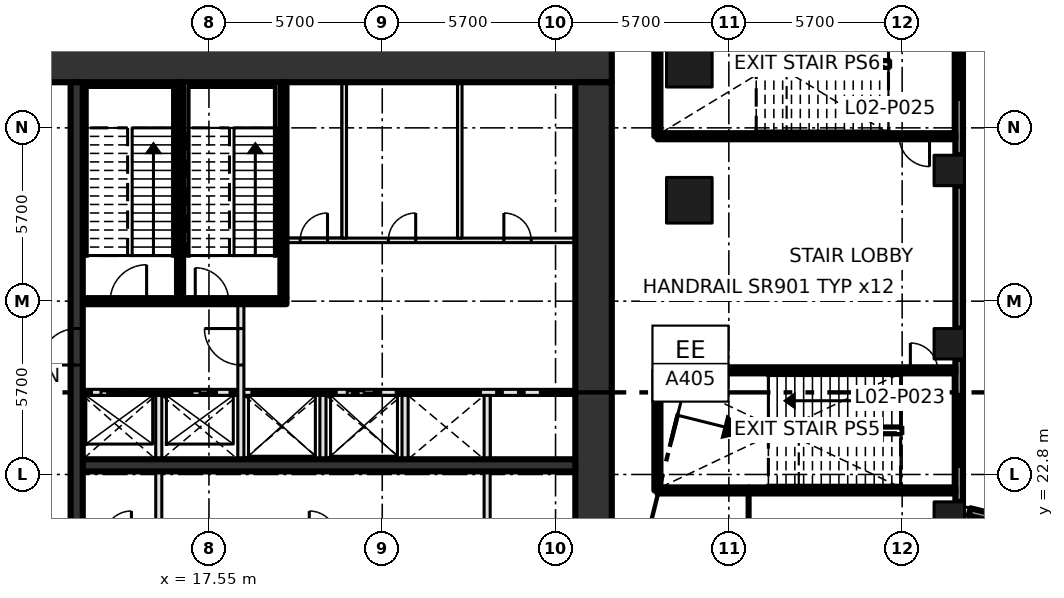
"""IFC4 building model, lengths in metres.
Left out: names, types, materials, properties, quantities, classifications, styles, units other than length and angle.
Written with IfcOpenShell. Run it as: python <this file> out.ifc"""

import sys

from ifc_helpers import new_model, si_unit, direction, frame, frame_2d, origin, origin_2d, place, context, subcontext, project, spatial, rectangle, extrude, element, fill, save


model = new_model("IFC4")
c1 = context("Model", 3, precision=1e-05, world=origin(), true_north=direction((0.0, 1.0)))
c2 = subcontext(c1, "Body", "Model", "MODEL_VIEW")
j1 = project(units=[si_unit("LENGTHUNIT", "METRE"), si_unit("PLANEANGLEUNIT", "RADIAN")], contexts=[c1])
p1 = place(None, origin())
s1 = spatial("IfcSite", under=j1, at=p1, CompositionType="ELEMENT")
p2 = place(p1, origin())
s2 = spatial("IfcBuilding", under=s1, at=p2, CompositionType="ELEMENT")
p3 = place(p2, frame((0.0, 0.0, 12.6)))
s3 = spatial("IfcBuildingStorey", under=s2, at=p3, CompositionType="ELEMENT", Elevation=12.6)
for number, where, z_axis, x_axis in (
    (1, (33.35, 26.119, 0.0), (0.0, 0.0, 1.0), (1.0, 0.0, 0.0)),
    (2, (33.35, 31.819, 0.0), (0.0, 0.0, 1.0), (1.0, 0.0, 0.0)),
    (3, (33.35, 36.294, 0.0), (0.0, 0.0, 1.0), (1.0, 0.0, 0.0)),
):
    element("IfcColumn", number, at=place(p3, frame(where, z_axis=z_axis, x_axis=x_axis)), inside=s3, PredefinedType="COLUMN", context=c2, shape_type="SweptSolid", body=[
        extrude(rectangle(XDim=1.5, YDim=1.5, at=origin_2d()), origin(), (0.0, 0.0, 1.0), 6.0),
    ])
for number, where, z_axis, x_axis in (
    (4, (41.9, 21.399, 0.0), (0.0, 0.0, 1.0), (1.0, 0.0, 0.0)),
    (5, (41.9, 27.099, 0.0), (0.0, 0.0, 1.0), (1.0, 0.0, 0.0)),
    (6, (41.9, 32.799, 0.0), (0.0, 0.0, 1.0), (1.0, 0.0, 0.0)),
):
    element("IfcColumn", number, at=place(p3, frame(where, z_axis=z_axis, x_axis=x_axis)), inside=s3, PredefinedType="COLUMN", context=c2, shape_type="SweptSolid", body=[
        extrude(rectangle(XDim=1.0, YDim=1.0, at=origin_2d()), origin(), (0.0, 0.0, 1.0), 6.0),
    ])
p4 = place(p3, frame((8.0, 36.3, -0.45), z_axis=(0.0, 0.0, 1.0), x_axis=(1.0, 0.0, 0.0)))
e7 = element("IfcWall", 7, at=p4, inside=s3, PredefinedType="SHEAR", context=c2, shape_type="SweptSolid", body=[
    extrude(rectangle(XDim=22.8, YDim=1.2, at=frame_2d((11.4, 0.0))), origin(), (0.0, 0.0, 1.0), 6.0),
])
p5 = place(p4, frame((2.3, 0.0, 0.45)))
e8 = element("IfcOpeningElement", 8, at=p5, cuts=e7, PredefinedType="OPENING", context=c2, shape_type="SweptSolid", body=[
    extrude(rectangle(XDim=1.8, YDim=2.1, at=frame_2d((0.9, 1.05))), frame((0.0, 0.61, 0.0), z_axis=(0.0, -1.0, 0.0), x_axis=(1.0, 0.0, 0.0)), (0.0, 0.0, 1.0), 1.22),
])
p6 = place(p3, frame((30.2, 15.3, -0.45), z_axis=(0.0, 0.0, 1.0), x_axis=(0.0, 1.0, 0.0)))
e9 = element("IfcWall", 9, at=p6, inside=s3, PredefinedType="SHEAR", context=c2, shape_type="SweptSolid", body=[
    extrude(rectangle(XDim=20.4, YDim=1.2, at=frame_2d((10.2, 0.0))), origin(), (0.0, 0.0, 1.0), 6.0),
])
p7 = place(p3, frame((13.4, 23.1, 0.0), z_axis=(0.0, 0.0, 1.0), x_axis=(1.0, 0.0, 0.0)))
e10 = element("IfcWall", 10, at=p7, inside=s3, PredefinedType="SHEAR", context=c2, shape_type="SweptSolid", body=[
    extrude(rectangle(XDim=16.2, YDim=0.4, at=frame_2d((8.1, 0.0))), origin(), (0.0, 0.0, 1.0), 5.55),
])
p8 = place(p3, frame((13.4, 25.5, 0.0), z_axis=(0.0, 0.0, 1.0), x_axis=(1.0, 0.0, 0.0)))
e11 = element("IfcWall", 11, at=p8, inside=s3, PredefinedType="SOLIDWALL", context=c2, shape_type="SweptSolid", body=[
    extrude(rectangle(XDim=16.2, YDim=0.2, at=frame_2d((8.1, 0.0))), origin(), (0.0, 0.0, 1.0), 5.55),
])
p9 = place(p8, frame((0.6, 0.0, 0.0)))
e12 = element("IfcOpeningElement", 12, at=p9, cuts=e11, PredefinedType="OPENING", context=c2, shape_type="SweptSolid", body=[
    extrude(rectangle(XDim=1.1, YDim=2.1, at=frame_2d((0.55, 1.05))), frame((0.0, 0.11, 0.0), z_axis=(0.0, -1.0, 0.0), x_axis=(1.0, 0.0, 0.0)), (0.0, 0.0, 1.0), 0.22),
])
p10 = place(p8, frame((3.3, 0.0, 0.0)))
e13 = element("IfcOpeningElement", 13, at=p10, cuts=e11, PredefinedType="OPENING", context=c2, shape_type="SweptSolid", body=[
    extrude(rectangle(XDim=1.1, YDim=2.1, at=frame_2d((0.55, 1.05))), frame((0.0, 0.11, 0.0), z_axis=(0.0, -1.0, 0.0), x_axis=(1.0, 0.0, 0.0)), (0.0, 0.0, 1.0), 0.22),
])
p11 = place(p8, frame((6.0, 0.0, 0.0)))
e14 = element("IfcOpeningElement", 14, at=p11, cuts=e11, PredefinedType="OPENING", context=c2, shape_type="SweptSolid", body=[
    extrude(rectangle(XDim=1.1, YDim=2.1, at=frame_2d((0.55, 1.05))), frame((0.0, 0.11, 0.0), z_axis=(0.0, -1.0, 0.0), x_axis=(1.0, 0.0, 0.0)), (0.0, 0.0, 1.0), 0.22),
])
p12 = place(p8, frame((8.7, 0.0, 0.0)))
e15 = element("IfcOpeningElement", 15, at=p12, cuts=e11, PredefinedType="OPENING", context=c2, shape_type="SweptSolid", body=[
    extrude(rectangle(XDim=1.1, YDim=2.1, at=frame_2d((0.55, 1.05))), frame((0.0, 0.11, 0.0), z_axis=(0.0, -1.0, 0.0), x_axis=(1.0, 0.0, 0.0)), (0.0, 0.0, 1.0), 0.22),
])
p13 = place(p3, frame((13.4, 28.5, 0.0), z_axis=(0.0, 0.0, 1.0), x_axis=(1.0, 0.0, 0.0)))
e16 = element("IfcWall", 16, at=p13, inside=s3, PredefinedType="SOLIDWALL", context=c2, shape_type="SweptSolid", body=[
    extrude(rectangle(XDim=6.7, YDim=0.2, at=frame_2d((3.35, 0.0))), origin(), (0.0, 0.0, 1.0), 5.55),
])
p14 = place(p13, frame((0.9, 0.0, 0.0)))
e17 = element("IfcOpeningElement", 17, at=p14, cuts=e16, PredefinedType="OPENING", context=c2, shape_type="SweptSolid", body=[
    extrude(rectangle(XDim=1.2, YDim=2.1, at=frame_2d((0.6, 1.05))), frame((0.0, 0.11, 0.0), z_axis=(0.0, -1.0, 0.0), x_axis=(1.0, 0.0, 0.0)), (0.0, 0.0, 1.0), 0.22),
])
p15 = place(p13, frame((3.7, 0.0, 0.0)))
e18 = element("IfcOpeningElement", 18, at=p15, cuts=e16, PredefinedType="OPENING", context=c2, shape_type="SweptSolid", body=[
    extrude(rectangle(XDim=1.1, YDim=2.1, at=frame_2d((0.55, 1.05))), frame((0.0, 0.11, 0.0), z_axis=(0.0, -1.0, 0.0), x_axis=(1.0, 0.0, 0.0)), (0.0, 0.0, 1.0), 0.22),
])
p16 = place(p3, frame((20.1, 30.5, 0.0), z_axis=(0.0, 0.0, 1.0), x_axis=(1.0, 0.0, 0.0)))
e19 = element("IfcWall", 19, at=p16, inside=s3, PredefinedType="PARTITIONING", context=c2, shape_type="SweptSolid", body=[
    extrude(rectangle(XDim=9.5, YDim=0.15, at=frame_2d((4.75, 0.0))), origin(), (0.0, 0.0, 1.0), 5.55),
])
p17 = place(p16, frame((0.45, 0.0, 0.0)))
e20 = element("IfcOpeningElement", 20, at=p17, cuts=e19, PredefinedType="OPENING", context=c2, shape_type="SweptSolid", body=[
    extrude(rectangle(XDim=0.9, YDim=2.1, at=frame_2d((0.45, 1.05))), frame((0.0, 0.085, 0.0), z_axis=(0.0, -1.0, 0.0), x_axis=(1.0, 0.0, 0.0)), (0.0, 0.0, 1.0), 0.17),
])
p18 = place(p16, frame((3.35, 0.0, 0.0)))
e21 = element("IfcOpeningElement", 21, at=p18, cuts=e19, PredefinedType="OPENING", context=c2, shape_type="SweptSolid", body=[
    extrude(rectangle(XDim=0.9, YDim=2.1, at=frame_2d((0.45, 1.05))), frame((0.0, 0.085, 0.0), z_axis=(0.0, -1.0, 0.0), x_axis=(1.0, 0.0, 0.0)), (0.0, 0.0, 1.0), 0.17),
])
p19 = place(p16, frame((7.15, 0.0, 0.0)))
e22 = element("IfcOpeningElement", 22, at=p19, cuts=e19, PredefinedType="OPENING", context=c2, shape_type="SweptSolid", body=[
    extrude(rectangle(XDim=0.9, YDim=2.1, at=frame_2d((0.45, 1.05))), frame((0.0, 0.085, 0.0), z_axis=(0.0, -1.0, 0.0), x_axis=(1.0, 0.0, 0.0)), (0.0, 0.0, 1.0), 0.17),
])
p20 = place(p3, frame((13.2, 15.3, 0.0), z_axis=(0.0, 0.0, 1.0), x_axis=(0.0, 1.0, 0.0)))
e23 = element("IfcWall", 23, at=p20, inside=s3, PredefinedType="SHEAR", context=c2, shape_type="SweptSolid", body=[
    extrude(rectangle(XDim=20.4, YDim=0.4, at=frame_2d((10.2, 0.0))), origin(), (0.0, 0.0, 1.0), 5.55),
])
p21 = place(p20, frame((3.0, 0.0, 0.0)))
e24 = element("IfcOpeningElement", 24, at=p21, cuts=e23, PredefinedType="OPENING", context=c2, shape_type="SweptSolid", body=[
    extrude(rectangle(XDim=1.8, YDim=2.1, at=frame_2d((0.9, 1.05))), frame((0.0, 0.21, 0.0), z_axis=(0.0, -1.0, 0.0), x_axis=(1.0, 0.0, 0.0)), (0.0, 0.0, 1.0), 0.42),
])
p22 = place(p20, frame((11.1, 0.0, 0.0)))
e25 = element("IfcOpeningElement", 25, at=p22, cuts=e23, PredefinedType="OPENING", context=c2, shape_type="SweptSolid", body=[
    extrude(rectangle(XDim=1.2, YDim=2.1, at=frame_2d((0.6, 1.05))), frame((0.0, 0.21, 0.0), z_axis=(0.0, -1.0, 0.0), x_axis=(1.0, 0.0, 0.0)), (0.0, 0.0, 1.0), 0.42),
])
p23 = place(p3, frame((15.9, 20.775, 0.0), z_axis=(0.0, 0.0, 1.0), x_axis=(0.0, 1.0, 0.0)))
e26 = element("IfcWall", 26, at=p23, inside=s3, PredefinedType="SOLIDWALL", context=c2, shape_type="SweptSolid", body=[
    extrude(rectangle(XDim=4.625, YDim=0.2, at=frame_2d((2.312, 0.0))), origin(), (0.0, 0.0, 1.0), 5.55),
])
p24 = place(p3, frame((16.6, 28.6, 0.0), z_axis=(0.0, 0.0, 1.0), x_axis=(0.0, 1.0, 0.0)))
e27 = element("IfcWall", 27, at=p24, inside=s3, PredefinedType="SOLIDWALL", context=c2, shape_type="SweptSolid", body=[
    extrude(rectangle(XDim=7.1, YDim=0.2, at=frame_2d((3.55, 0.0))), origin(), (0.0, 0.0, 1.0), 5.55),
])
p25 = place(p3, frame((18.6, 23.3, 0.0), z_axis=(0.0, 0.0, 1.0), x_axis=(0.0, 1.0, 0.0)))
e28 = element("IfcWall", 28, at=p25, inside=s3, PredefinedType="SOLIDWALL", context=c2, shape_type="SweptSolid", body=[
    extrude(rectangle(XDim=5.1, YDim=0.2, at=frame_2d((2.55, 0.0))), origin(), (0.0, 0.0, 1.0), 5.55),
])
p26 = place(p25, frame((3.1, 0.0, 0.0)))
e29 = element("IfcOpeningElement", 29, at=p26, cuts=e28, PredefinedType="OPENING", context=c2, shape_type="SweptSolid", body=[
    extrude(rectangle(XDim=1.2, YDim=2.1, at=frame_2d((0.6, 1.05))), frame((0.0, 0.11, 0.0), z_axis=(0.0, -1.0, 0.0), x_axis=(1.0, 0.0, 0.0)), (0.0, 0.0, 1.0), 0.22),
])
p27 = place(p3, frame((20.0, 28.6, 0.0), z_axis=(0.0, 0.0, 1.0), x_axis=(0.0, 1.0, 0.0)))
e30 = element("IfcWall", 30, at=p27, inside=s3, PredefinedType="SOLIDWALL", context=c2, shape_type="SweptSolid", body=[
    extrude(rectangle(XDim=7.1, YDim=0.2, at=frame_2d((3.55, 0.0))), origin(), (0.0, 0.0, 1.0), 5.55),
])
p28 = place(p3, frame((21.3, 23.3, 0.0), z_axis=(0.0, 0.0, 1.0), x_axis=(0.0, 1.0, 0.0)))
e31 = element("IfcWall", 31, at=p28, inside=s3, PredefinedType="SOLIDWALL", context=c2, shape_type="SweptSolid", body=[
    extrude(rectangle(XDim=2.1, YDim=0.2, at=frame_2d((1.05, 0.0))), origin(), (0.0, 0.0, 1.0), 5.55),
])
p29 = place(p3, frame((22.0, 30.575, 0.0), z_axis=(0.0, 0.0, 1.0), x_axis=(0.0, 1.0, 0.0)))
e32 = element("IfcWall", 32, at=p29, inside=s3, PredefinedType="PARTITIONING", context=c2, shape_type="SweptSolid", body=[
    extrude(rectangle(XDim=5.125, YDim=0.15, at=frame_2d((2.562, 0.0))), origin(), (0.0, 0.0, 1.0), 5.55),
])
p30 = place(p3, frame((24.0, 23.3, 0.0), z_axis=(0.0, 0.0, 1.0), x_axis=(0.0, 1.0, 0.0)))
e33 = element("IfcWall", 33, at=p30, inside=s3, PredefinedType="SOLIDWALL", context=c2, shape_type="SweptSolid", body=[
    extrude(rectangle(XDim=2.1, YDim=0.2, at=frame_2d((1.05, 0.0))), origin(), (0.0, 0.0, 1.0), 5.55),
])
p31 = place(p3, frame((25.8, 30.575, 0.0), z_axis=(0.0, 0.0, 1.0), x_axis=(0.0, 1.0, 0.0)))
e34 = element("IfcWall", 34, at=p31, inside=s3, PredefinedType="PARTITIONING", context=c2, shape_type="SweptSolid", body=[
    extrude(rectangle(XDim=5.125, YDim=0.15, at=frame_2d((2.562, 0.0))), origin(), (0.0, 0.0, 1.0), 5.55),
])
p32 = place(p3, frame((26.7, 20.775, 0.0), z_axis=(0.0, 0.0, 1.0), x_axis=(0.0, 1.0, 0.0)))
e35 = element("IfcWall", 35, at=p32, inside=s3, PredefinedType="SOLIDWALL", context=c2, shape_type="SweptSolid", body=[
    extrude(rectangle(XDim=4.625, YDim=0.2, at=frame_2d((2.312, 0.0))), origin(), (0.0, 0.0, 1.0), 5.55),
])
p33 = place(p3, frame((32.3, 22.275, 0.0), z_axis=(0.0, 0.0, 1.0), x_axis=(0.0, 1.0, 0.0)))
e36 = element("IfcWall", 36, at=p33, inside=s3, PredefinedType="SOLIDWALL", context=c2, shape_type="SweptSolid", body=[
    extrude(rectangle(XDim=3.95, YDim=0.2, at=frame_2d((1.975, 0.0))), origin(), (0.0, 0.0, 1.0), 5.55),
])
p34 = place(p3, frame((32.3, 33.925, 0.0), z_axis=(0.0, 0.0, 1.0), x_axis=(0.0, 1.0, 0.0)))
e37 = element("IfcWall", 37, at=p34, inside=s3, PredefinedType="SOLIDWALL", context=c2, shape_type="SweptSolid", body=[
    extrude(rectangle(XDim=4.75, YDim=0.2, at=frame_2d((2.375, 0.0))), origin(), (0.0, 0.0, 1.0), 5.55),
])
p35 = place(p3, frame((34.12, 26.225, 0.0), z_axis=(0.0, 0.0, 1.0), x_axis=(1.0, 0.0, 0.0)))
e38 = element("IfcWall", 38, at=p35, inside=s3, PredefinedType="SOLIDWALL", context=c2, shape_type="SweptSolid", body=[
    extrude(rectangle(XDim=7.98, YDim=0.2, at=frame_2d((3.99, 0.0))), origin(), (0.0, 0.0, 1.0), 5.55),
])
p36 = place(p35, frame((6.5, 0.0, 0.0)))
e39 = element("IfcOpeningElement", 39, at=p36, cuts=e38, PredefinedType="OPENING", context=c2, shape_type="SweptSolid", body=[
    extrude(rectangle(XDim=0.9, YDim=2.1, at=frame_2d((0.45, 1.05))), frame((0.0, 0.11, 0.0), z_axis=(0.0, -1.0, 0.0), x_axis=(1.0, 0.0, 0.0)), (0.0, 0.0, 1.0), 0.22),
])
p37 = place(p3, frame((35.3, 9.6, 0.0), z_axis=(0.0, 0.0, 1.0), x_axis=(0.0, 1.0, 0.0)))
e40 = element("IfcWall", 40, at=p37, inside=s3, PredefinedType="PARTITIONING", context=c2, shape_type="SweptSolid", body=[
    extrude(rectangle(XDim=12.675, YDim=0.1, at=frame_2d((6.337, 0.0))), origin(), (0.0, 0.0, 1.0), 5.55),
])
p38 = place(p37, frame((8.28, 0.0, 0.0)))
e41 = element("IfcOpeningElement", 41, at=p38, cuts=e40, PredefinedType="OPENING", context=c2, shape_type="SweptSolid", body=[
    extrude(rectangle(XDim=1.0, YDim=2.1, at=frame_2d((0.5, 1.05))), frame((0.0, 0.06, 0.0), z_axis=(0.0, -1.0, 0.0), x_axis=(1.0, 0.0, 0.0)), (0.0, 0.0, 1.0), 0.12),
])
p39 = place(p3, frame((35.3, 22.275, 0.0), z_axis=(0.0, 0.0, 1.0), x_axis=(-1.0, 0.0, 0.0)))
e42 = element("IfcWall", 42, at=p39, inside=s3, PredefinedType="SOLIDWALL", context=c2, shape_type="SweptSolid", body=[
    extrude(rectangle(XDim=3.0, YDim=0.2, at=frame_2d((1.5, 0.0))), origin(), (0.0, 0.0, 1.0), 5.55),
])
p40 = place(p3, frame((42.1, 33.925, 0.0), z_axis=(0.0, 0.0, 1.0), x_axis=(-1.0, 0.0, 0.0)))
e43 = element("IfcWall", 43, at=p40, inside=s3, PredefinedType="SOLIDWALL", context=c2, shape_type="SweptSolid", body=[
    extrude(rectangle(XDim=9.8, YDim=0.2, at=frame_2d((4.9, 0.0))), origin(), (0.0, 0.0, 1.0), 5.55),
])
p41 = place(p40, frame((0.85, 0.0, 0.0)))
e44 = element("IfcOpeningElement", 44, at=p41, cuts=e43, PredefinedType="OPENING", context=c2, shape_type="SweptSolid", body=[
    extrude(rectangle(XDim=1.0, YDim=2.1, at=frame_2d((0.5, 1.05))), frame((0.0, 0.11, 0.0), z_axis=(0.0, -1.0, 0.0), x_axis=(1.0, 0.0, 0.0)), (0.0, 0.0, 1.0), 0.22),
])
p42 = place(p3, frame((35.3, 22.275, 0.0), z_axis=(0.0, 0.0, 1.0), x_axis=(1.0, 0.0, 0.0)))
e45 = element("IfcWall", 45, at=p42, inside=s3, PredefinedType="SOLIDWALL", context=c2, shape_type="SweptSolid", body=[
    extrude(rectangle(XDim=6.8, YDim=0.2, at=frame_2d((3.4, 0.0))), origin(), (0.0, 0.0, 1.0), 5.55),
])
p43 = place(p3, frame((46.922, 20.482, 0.0), z_axis=(0.0, 0.0, 1.0), x_axis=(-0.970279921141, 0.241985277715, 0.0)))
e46 = element("IfcWall", 46, at=p43, inside=s3, PredefinedType="SOLIDWALL", context=c2, shape_type="SweptSolid", body=[
    extrude(rectangle(XDim=4.489, YDim=0.25, at=frame_2d((2.244, 0.0))), origin(), (0.0, 0.0, 1.0), 4.65),
])
p44 = place(p43, frame((1.397, 0.0, 0.9)))
e47 = element("IfcOpeningElement", 47, at=p44, cuts=e46, PredefinedType="OPENING", context=c2, shape_type="SweptSolid", body=[
    extrude(rectangle(XDim=2.4, YDim=3.3, at=frame_2d((1.2, 1.65))), frame((0.0, 0.135, 0.0), z_axis=(0.0, -1.0, 0.0), x_axis=(1.0, 0.0, 0.0)), (0.0, 0.0, 1.0), 0.27),
])
p45 = place(p3, frame((42.225, 21.899, 0.0), z_axis=(0.0, 0.0, 1.0), x_axis=(0.0, 1.0, 0.0)))
e48 = element("IfcWall", 48, at=p45, inside=s3, PredefinedType="SOLIDWALL", context=c2, shape_type="SweptSolid", body=[
    extrude(rectangle(XDim=4.7, YDim=0.25, at=frame_2d((2.35, 0.0))), origin(), (0.0, 0.0, 1.0), 4.65),
])
p46 = place(p45, frame((1.15, 0.0, 0.9)))
e49 = element("IfcOpeningElement", 49, at=p46, cuts=e48, PredefinedType="OPENING", context=c2, shape_type="SweptSolid", body=[
    extrude(rectangle(XDim=2.4, YDim=3.3, at=frame_2d((1.2, 1.65))), frame((0.0, 0.135, 0.0), z_axis=(0.0, -1.0, 0.0), x_axis=(1.0, 0.0, 0.0)), (0.0, 0.0, 1.0), 0.27),
])
p47 = place(p3, frame((42.225, 27.599, 0.0), z_axis=(0.0, 0.0, 1.0), x_axis=(0.0, 1.0, 0.0)))
e50 = element("IfcWall", 50, at=p47, inside=s3, PredefinedType="SOLIDWALL", context=c2, shape_type="SweptSolid", body=[
    extrude(rectangle(XDim=4.7, YDim=0.25, at=frame_2d((2.35, 0.0))), origin(), (0.0, 0.0, 1.0), 4.65),
])
p48 = place(p3, frame((42.225, 33.299, 0.0), z_axis=(0.0, 0.0, 1.0), x_axis=(0.0, 1.0, 0.0)))
e51 = element("IfcWall", 51, at=p48, inside=s3, PredefinedType="SOLIDWALL", context=c2, shape_type="SweptSolid", body=[
    extrude(rectangle(XDim=6.037, YDim=0.25, at=frame_2d((3.019, 0.0))), origin(), (0.0, 0.0, 1.0), 4.65),
])
p49 = place(p48, frame((1.819, 0.0, 0.9)))
e52 = element("IfcOpeningElement", 52, at=p49, cuts=e51, PredefinedType="OPENING", context=c2, shape_type="SweptSolid", body=[
    extrude(rectangle(XDim=2.4, YDim=3.3, at=frame_2d((1.2, 1.65))), frame((0.0, 0.135, 0.0), z_axis=(0.0, -1.0, 0.0), x_axis=(1.0, 0.0, 0.0)), (0.0, 0.0, 1.0), 0.27),
])
p50 = place(p9, origin())
e53 = element("IfcDoor", 53, at=p50, inside=s3, OperationType="SLIDING_TO_LEFT", PredefinedType="DOOR", context=c2, shape_type="SweptSolid", body=[
    extrude(rectangle(XDim=1.1, YDim=2.1, at=frame_2d((0.55, 1.05))), frame((0.0, 0.025, 0.0), z_axis=(0.0, -1.0, 0.0), x_axis=(1.0, 0.0, 0.0)), (0.0, 0.0, 1.0), 0.05),
])
fill(e12, e53)
p51 = place(p10, origin())
e54 = element("IfcDoor", 54, at=p51, inside=s3, OperationType="SLIDING_TO_LEFT", PredefinedType="DOOR", context=c2, shape_type="SweptSolid", body=[
    extrude(rectangle(XDim=1.1, YDim=2.1, at=frame_2d((0.55, 1.05))), frame((0.0, 0.025, 0.0), z_axis=(0.0, -1.0, 0.0), x_axis=(1.0, 0.0, 0.0)), (0.0, 0.0, 1.0), 0.05),
])
fill(e13, e54)
p52 = place(p11, origin())
e55 = element("IfcDoor", 55, at=p52, inside=s3, OperationType="SLIDING_TO_LEFT", PredefinedType="DOOR", context=c2, shape_type="SweptSolid", body=[
    extrude(rectangle(XDim=1.1, YDim=2.1, at=frame_2d((0.55, 1.05))), frame((0.0, 0.025, 0.0), z_axis=(0.0, -1.0, 0.0), x_axis=(1.0, 0.0, 0.0)), (0.0, 0.0, 1.0), 0.05),
])
fill(e14, e55)
p53 = place(p12, origin())
e56 = element("IfcDoor", 56, at=p53, inside=s3, OperationType="SLIDING_TO_LEFT", PredefinedType="DOOR", context=c2, shape_type="SweptSolid", body=[
    extrude(rectangle(XDim=1.1, YDim=2.1, at=frame_2d((0.55, 1.05))), frame((0.0, 0.025, 0.0), z_axis=(0.0, -1.0, 0.0), x_axis=(1.0, 0.0, 0.0)), (0.0, 0.0, 1.0), 0.05),
])
fill(e15, e56)
p54 = place(p17, origin())
e57 = element("IfcDoor", 57, at=p54, inside=s3, OperationType="SINGLE_SWING_RIGHT", PredefinedType="DOOR", context=c2, shape_type="SweptSolid", body=[
    extrude(rectangle(XDim=0.9, YDim=2.1, at=frame_2d((0.45, 1.05))), frame((0.0, 0.025, 0.0), z_axis=(0.0, -1.0, 0.0), x_axis=(1.0, 0.0, 0.0)), (0.0, 0.0, 1.0), 0.05),
])
fill(e20, e57)
p55 = place(p18, origin())
e58 = element("IfcDoor", 58, at=p55, inside=s3, OperationType="SINGLE_SWING_RIGHT", PredefinedType="DOOR", context=c2, shape_type="SweptSolid", body=[
    extrude(rectangle(XDim=0.9, YDim=2.1, at=frame_2d((0.45, 1.05))), frame((0.0, 0.025, 0.0), z_axis=(0.0, -1.0, 0.0), x_axis=(1.0, 0.0, 0.0)), (0.0, 0.0, 1.0), 0.05),
])
fill(e21, e58)
p56 = place(p19, origin())
e59 = element("IfcDoor", 59, at=p56, inside=s3, OperationType="SINGLE_SWING_LEFT", PredefinedType="DOOR", context=c2, shape_type="SweptSolid", body=[
    extrude(rectangle(XDim=0.9, YDim=2.1, at=frame_2d((0.45, 1.05))), frame((0.0, 0.025, 0.0), z_axis=(0.0, -1.0, 0.0), x_axis=(1.0, 0.0, 0.0)), (0.0, 0.0, 1.0), 0.05),
])
fill(e22, e59)
p57 = place(p14, origin())
e60 = element("IfcDoor", 60, at=p57, inside=s3, OperationType="SINGLE_SWING_RIGHT", PredefinedType="DOOR", context=c2, shape_type="SweptSolid", body=[
    extrude(rectangle(XDim=1.2, YDim=2.1, at=frame_2d((0.6, 1.05))), frame((0.0, 0.025, 0.0), z_axis=(0.0, -1.0, 0.0), x_axis=(1.0, 0.0, 0.0)), (0.0, 0.0, 1.0), 0.05),
])
fill(e17, e60)
p58 = place(p15, origin())
e61 = element("IfcDoor", 61, at=p58, inside=s3, OperationType="SINGLE_SWING_LEFT", PredefinedType="DOOR", context=c2, shape_type="SweptSolid", body=[
    extrude(rectangle(XDim=1.1, YDim=2.1, at=frame_2d((0.55, 1.05))), frame((0.0, 0.025, 0.0), z_axis=(0.0, -1.0, 0.0), x_axis=(1.0, 0.0, 0.0)), (0.0, 0.0, 1.0), 0.05),
])
fill(e18, e61)
p59 = place(p22, origin())
e62 = element("IfcDoor", 62, at=p59, inside=s3, OperationType="SINGLE_SWING_LEFT", PredefinedType="DOOR", context=c2, shape_type="SweptSolid", body=[
    extrude(rectangle(XDim=1.2, YDim=2.1, at=frame_2d((0.6, 1.05))), frame((0.0, 0.025, 0.0), z_axis=(0.0, -1.0, 0.0), x_axis=(1.0, 0.0, 0.0)), (0.0, 0.0, 1.0), 0.05),
])
fill(e25, e62)
p60 = place(p26, origin())
e63 = element("IfcDoor", 63, at=p60, inside=s3, OperationType="SINGLE_SWING_RIGHT", PredefinedType="DOOR", context=c2, shape_type="SweptSolid", body=[
    extrude(rectangle(XDim=1.2, YDim=2.1, at=frame_2d((0.6, 1.05))), frame((0.0, 0.025, 0.0), z_axis=(0.0, -1.0, 0.0), x_axis=(1.0, 0.0, 0.0)), (0.0, 0.0, 1.0), 0.05),
])
fill(e29, e63)
p61 = place(p36, origin())
e64 = element("IfcDoor", 64, at=p61, inside=s3, OperationType="SINGLE_SWING_LEFT", PredefinedType="DOOR", context=c2, shape_type="SweptSolid", body=[
    extrude(rectangle(XDim=0.9, YDim=2.1, at=frame_2d((0.45, 1.05))), frame((0.0, 0.025, 0.0), z_axis=(0.0, -1.0, 0.0), x_axis=(1.0, 0.0, 0.0)), (0.0, 0.0, 1.0), 0.05),
])
fill(e39, e64)
p62 = place(p41, origin())
e65 = element("IfcDoor", 65, at=p62, inside=s3, OperationType="SINGLE_SWING_LEFT", PredefinedType="DOOR", context=c2, shape_type="SweptSolid", body=[
    extrude(rectangle(XDim=1.0, YDim=2.1, at=frame_2d((0.5, 1.05))), frame((0.0, 0.025, 0.0), z_axis=(0.0, -1.0, 0.0), x_axis=(1.0, 0.0, 0.0)), (0.0, 0.0, 1.0), 0.05),
])
fill(e44, e65)
p63 = place(p46, origin())
e66 = element("IfcWindow", 66, at=p63, inside=s3, PartitioningType="DOUBLE_PANEL_VERTICAL", PredefinedType="WINDOW", context=c2, shape_type="SweptSolid", body=[
    extrude(rectangle(XDim=2.4, YDim=3.3, at=frame_2d((1.2, 1.65))), frame((0.0, 0.03, 0.0), z_axis=(0.0, -1.0, 0.0), x_axis=(1.0, 0.0, 0.0)), (0.0, 0.0, 1.0), 0.06),
])
fill(e49, e66)
p64 = place(p49, origin())
e67 = element("IfcWindow", 67, at=p64, inside=s3, PartitioningType="DOUBLE_PANEL_VERTICAL", PredefinedType="WINDOW", context=c2, shape_type="SweptSolid", body=[
    extrude(rectangle(XDim=2.4, YDim=3.3, at=frame_2d((1.2, 1.65))), frame((0.0, 0.03, 0.0), z_axis=(0.0, -1.0, 0.0), x_axis=(1.0, 0.0, 0.0)), (0.0, 0.0, 1.0), 0.06),
])
fill(e52, e67)
save(model, sys.argv[1])
